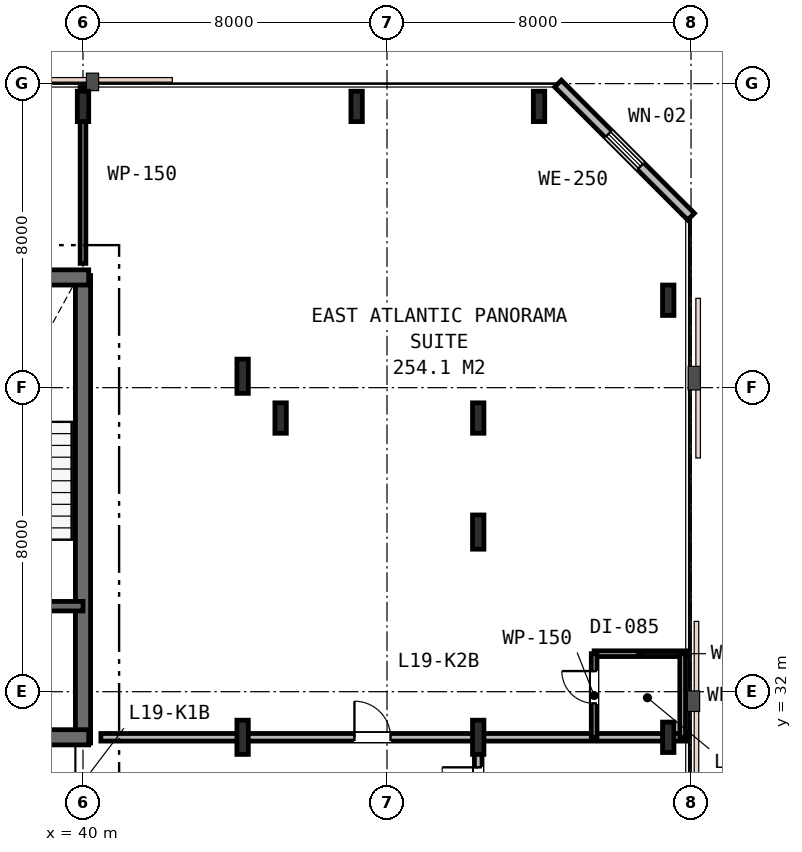
"""IFC4 building model, lengths in metres.
Left out: names, types, materials, properties, quantities, classifications, styles, units other than length and angle.
Written with IfcOpenShell. Run it as: python <this file> out.ifc"""

import sys

from ifc_helpers import new_model, si_unit, direction, frame, frame_2d, origin, origin_2d, place, context, subcontext, project, spatial, rectangle, i_section, extrude, element, fill, save


model = new_model("IFC4")
c1 = context("Model", 3, precision=1e-05, world=origin(), true_north=direction((0.0, 1.0)))
c2 = subcontext(c1, "Body", "Model", "MODEL_VIEW")
j1 = project(units=[si_unit("LENGTHUNIT", "METRE"), si_unit("PLANEANGLEUNIT", "RADIAN")], contexts=[c1])
p1 = place(None, origin())
s1 = spatial("IfcSite", under=j1, at=p1, CompositionType="ELEMENT")
p2 = place(p1, origin())
s2 = spatial("IfcBuilding", under=s1, at=p2, CompositionType="ELEMENT")
p3 = place(p2, frame((0.0, 0.0, 76.2)))
s3 = spatial("IfcBuildingStorey", under=s2, at=p3, CompositionType="ELEMENT", Elevation=76.2)
p4 = place(p3, frame((40.0, 30.65, 0.0), z_axis=(0.0, 0.0, 1.0), x_axis=(0.0, 1.0, 0.0)))
e1 = element("IfcWall", 1, at=p4, inside=s3, PredefinedType="SHEAR", context=c2, shape_type="SweptSolid", body=[
    extrude(rectangle(XDim=12.3, YDim=0.4, at=frame_2d((6.15, 0.0))), origin(), (0.0, 0.0, 1.0), 3.6),
])
p5 = place(p3, frame((15.85, 42.9, 0.0), z_axis=(0.0, 0.0, 1.0), x_axis=(1.0, 0.0, 0.0)))
e2 = element("IfcWall", 2, at=p5, inside=s3, PredefinedType="SHEAR", context=c2, shape_type="SweptSolid", body=[
    extrude(rectangle(XDim=24.3, YDim=0.4, at=frame_2d((12.15, 0.0))), origin(), (0.0, 0.0, 1.0), 3.6),
])
p6 = place(p3, frame((28.95, 30.8, 0.0), z_axis=(0.0, 0.0, 1.0), x_axis=(1.0, 0.0, 0.0)))
e3 = element("IfcWall", 3, at=p6, inside=s3, PredefinedType="SHEAR", context=c2, shape_type="SweptSolid", body=[
    extrude(rectangle(XDim=11.2, YDim=0.4, at=frame_2d((5.6, 0.0))), origin(), (0.0, 0.0, 1.0), 3.6),
])
p7 = place(p6, frame((7.65, 0.0, 0.0)))
e4 = element("IfcOpeningElement", 4, at=p7, cuts=e3, PredefinedType="OPENING", context=c2, shape_type="SweptSolid", body=[
    extrude(rectangle(XDim=1.1, YDim=2.15, at=frame_2d((0.55, 1.075))), frame((0.0, 0.21, 0.0), z_axis=(0.0, -1.0, 0.0), x_axis=(1.0, 0.0, 0.0)), (0.0, 0.0, 1.0), 0.42),
])
p8 = place(p3, frame((33.95, 34.25, 0.0), z_axis=(0.0, 0.0, 1.0), x_axis=(1.0, 0.0, 0.0)))
e5 = element("IfcWall", 5, at=p8, inside=s3, PredefinedType="SHEAR", context=c2, shape_type="SweptSolid", body=[
    extrude(rectangle(XDim=6.05, YDim=0.25, at=frame_2d((3.025, 0.0))), origin(), (0.0, 0.0, 1.0), 3.6),
])
p9 = place(p8, frame((3.7, 0.0, 0.0)))
e6 = element("IfcOpeningElement", 6, at=p9, cuts=e5, PredefinedType="OPENING", context=c2, shape_type="SweptSolid", body=[
    extrude(rectangle(XDim=1.0, YDim=2.15, at=frame_2d((0.5, 1.075))), frame((0.0, 0.135, 0.0), z_axis=(0.0, -1.0, 0.0), x_axis=(1.0, 0.0, 0.0)), (0.0, 0.0, 1.0), 0.27),
])
p10 = place(p8, frame((0.55, 0.0, 0.0)))
e7 = element("IfcOpeningElement", 7, at=p10, cuts=e5, PredefinedType="OPENING", context=c2, shape_type="SweptSolid", body=[
    extrude(rectangle(XDim=1.1, YDim=2.15, at=frame_2d((0.55, 1.075))), frame((0.0, 0.135, 0.0), z_axis=(0.0, -1.0, 0.0), x_axis=(1.0, 0.0, 0.0)), (0.0, 0.0, 1.0), 0.27),
])
for number, where, z_axis, x_axis in (
    (8, (45.2, 39.2, 0.0), (0.0, 0.0, 1.0), (1.0, 0.0, 0.0)),
    (9, (40.0, 47.4, 0.0), (0.0, 0.0, 1.0), (1.0, 0.0, 0.0)),
    (10, (47.2, 47.4, 0.0), (0.0, 0.0, 1.0), (1.0, 0.0, 0.0)),
    (11, (50.4, 39.2, 0.0), (0.0, 0.0, 1.0), (1.0, 0.0, 0.0)),
    (12, (55.4, 30.8, 0.0), (0.0, 0.0, 1.0), (1.0, 0.0, 0.0)),
    (13, (55.4, 42.3, 0.0), (0.0, 0.0, 1.0), (1.0, 0.0, 0.0)),
    (14, (52.0, 47.4, 0.0), (0.0, 0.0, 1.0), (1.0, 0.0, 0.0)),
):
    element("IfcColumn", number, at=place(p3, frame(where, z_axis=z_axis, x_axis=x_axis)), inside=s3, PredefinedType="COLUMN", context=c2, shape_type="SweptSolid", body=[
        extrude(i_section(OverallWidth=0.3, OverallDepth=0.8, WebThickness=0.018, FlangeThickness=0.033, FilletRadius=0.03, at=origin_2d()), origin(), (0.0, 0.0, 1.0), 3.6),
    ])
for number, where, z_axis, x_axis in (
    (15, (44.2, 30.8, 0.0), (0.0, 0.0, 1.0), (1.0, 0.0, 0.0)),
    (16, (44.2, 40.3, 0.0), (0.0, 0.0, 1.0), (1.0, 0.0, 0.0)),
    (17, (50.4, 30.8, 0.0), (0.0, 0.0, 1.0), (1.0, 0.0, 0.0)),
    (18, (50.4, 36.2, 0.0), (0.0, 0.0, 1.0), (1.0, 0.0, 0.0)),
):
    element("IfcColumn", number, at=place(p3, frame(where, z_axis=z_axis, x_axis=x_axis)), inside=s3, PredefinedType="COLUMN", context=c2, shape_type="SweptSolid", body=[
        extrude(i_section(OverallWidth=0.3, OverallDepth=0.9, WebThickness=0.018, FlangeThickness=0.035, FilletRadius=0.03, at=origin_2d()), origin(), (0.0, 0.0, 1.0), 3.6),
    ])
p11 = place(p3, frame((56.0, 44.5, 0.0), z_axis=(0.0, 0.0, 1.0), x_axis=(-0.707106781187, 0.707106781187, 0.0)))
e19 = element("IfcWall", 19, at=p11, inside=s3, PredefinedType="STANDARD", context=c2, shape_type="SweptSolid", body=[
    extrude(rectangle(XDim=4.95, YDim=0.25, at=frame_2d((2.475, 0.0))), origin(), (0.0, 0.0, 1.0), 3.24),
])
p12 = place(p11, frame((1.875, 0.0, 0.85)))
e20 = element("IfcOpeningElement", 20, at=p12, cuts=e19, PredefinedType="OPENING", context=c2, shape_type="SweptSolid", body=[
    extrude(rectangle(XDim=1.2, YDim=1.6, at=frame_2d((0.6, 0.8))), frame((0.0, 0.135, 0.0), z_axis=(0.0, -1.0, 0.0), x_axis=(1.0, 0.0, 0.0)), (0.0, 0.0, 1.0), 0.27),
])
p13 = place(p3, frame((40.0, 43.27, 0.0), z_axis=(0.0, 0.0, 1.0), x_axis=(0.0, 1.0, 0.0)))
e21 = element("IfcWall", 21, at=p13, inside=s3, PredefinedType="PARTITIONING", context=c2, shape_type="SweptSolid", body=[
    extrude(rectangle(XDim=4.63, YDim=0.15, at=frame_2d((2.315, 0.0))), origin(), (0.0, 0.0, 1.0), 2.83),
])
p14 = place(p3, frame((40.47, 30.8, 0.0), z_axis=(0.0, 0.0, 1.0), x_axis=(1.0, 0.0, 0.0)))
e22 = element("IfcWall", 22, at=p14, inside=s3, PredefinedType="PARTITIONING", context=c2, shape_type="SweptSolid", body=[
    extrude(rectangle(XDim=15.43, YDim=0.2, at=frame_2d((7.715, 0.0))), origin(), (0.0, 0.0, 1.0), 2.74),
])
p15 = place(p14, frame((6.673, 0.0, 0.0)))
e23 = element("IfcOpeningElement", 23, at=p15, cuts=e22, PredefinedType="OPENING", context=c2, shape_type="SweptSolid", body=[
    extrude(rectangle(XDim=0.95, YDim=2.15, at=frame_2d((0.475, 1.075))), frame((0.0, 0.11, 0.0), z_axis=(0.0, -1.0, 0.0), x_axis=(1.0, 0.0, 0.0)), (0.0, 0.0, 1.0), 0.22),
])
p16 = place(p3, frame((53.45, 33.0, 0.0), z_axis=(0.0, 0.0, 1.0), x_axis=(1.0, 0.0, 0.0)))
e24 = element("IfcWall", 24, at=p16, inside=s3, PredefinedType="PARTITIONING", context=c2, shape_type="SweptSolid", body=[
    extrude(rectangle(XDim=2.45, YDim=0.15, at=frame_2d((1.225, 0.0))), origin(), (0.0, 0.0, 1.0), 2.83),
])
p17 = place(p3, frame((53.45, 30.8, 0.0), z_axis=(0.0, 0.0, 1.0), x_axis=(0.0, 1.0, 0.0)))
e25 = element("IfcWall", 25, at=p17, inside=s3, PredefinedType="PARTITIONING", context=c2, shape_type="SweptSolid", body=[
    extrude(rectangle(XDim=2.2, YDim=0.15, at=frame_2d((1.1, 0.0))), origin(), (0.0, 0.0, 1.0), 2.74),
])
p18 = place(p17, frame((0.892, 0.0, 0.0)))
e26 = element("IfcOpeningElement", 26, at=p18, cuts=e25, PredefinedType="OPENING", context=c2, shape_type="SweptSolid", body=[
    extrude(rectangle(XDim=0.85, YDim=2.15, at=frame_2d((0.425, 1.075))), frame((0.0, 0.085, 0.0), z_axis=(0.0, -1.0, 0.0), x_axis=(1.0, 0.0, 0.0)), (0.0, 0.0, 1.0), 0.17),
])
p19 = place(p3, frame((55.78, 33.0, 0.0), z_axis=(0.0, 0.0, 1.0), x_axis=(0.0, -1.0, 0.0)))
e27 = element("IfcWall", 27, at=p19, inside=s3, PredefinedType="PARTITIONING", context=c2, shape_type="SweptSolid", body=[
    extrude(rectangle(XDim=2.2, YDim=0.15, at=frame_2d((1.1, 0.0))), origin(), (0.0, 0.0, 1.0), 2.74),
])
p20 = place(p3, frame((50.4, 28.6, 0.0), z_axis=(0.0, 0.0, 1.0), x_axis=(0.0, 1.0, 0.0)))
e28 = element("IfcWall", 28, at=p20, inside=s3, PredefinedType="PARTITIONING", context=c2, shape_type="SweptSolid", body=[
    extrude(rectangle(XDim=2.2, YDim=0.2, at=frame_2d((1.1, 0.0))), origin(), (0.0, 0.0, 1.0), 2.74),
])
p21 = place(p20, frame((0.46, 0.0, 0.0)))
e29 = element("IfcOpeningElement", 29, at=p21, cuts=e28, PredefinedType="OPENING", context=c2, shape_type="SweptSolid", body=[
    extrude(rectangle(XDim=0.95, YDim=2.15, at=frame_2d((0.475, 1.075))), frame((0.0, 0.11, 0.0), z_axis=(0.0, -1.0, 0.0), x_axis=(1.0, 0.0, 0.0)), (0.0, 0.0, 1.0), 0.22),
])
p22 = place(p12, origin())
e30 = element("IfcWindow", 30, at=p22, inside=s3, PartitioningType="SINGLE_PANEL", PredefinedType="WINDOW", context=c2, shape_type="SweptSolid", body=[
    extrude(rectangle(XDim=1.2, YDim=1.6, at=frame_2d((0.6, 0.8))), frame((0.0, 0.03, 0.0), z_axis=(0.0, -1.0, 0.0), x_axis=(1.0, 0.0, 0.0)), (0.0, 0.0, 1.0), 0.06),
])
fill(e20, e30)
p23 = place(p15, origin())
e31 = element("IfcDoor", 31, at=p23, inside=s3, OperationType="SINGLE_SWING_LEFT", PredefinedType="DOOR", context=c2, shape_type="SweptSolid", body=[
    extrude(rectangle(XDim=0.95, YDim=2.15, at=frame_2d((0.475, 1.075))), frame((0.0, 0.025, 0.0), z_axis=(0.0, -1.0, 0.0), x_axis=(1.0, 0.0, 0.0)), (0.0, 0.0, 1.0), 0.05),
])
fill(e23, e31)
p24 = place(p18, origin())
e32 = element("IfcDoor", 32, at=p24, inside=s3, OperationType="SINGLE_SWING_RIGHT", PredefinedType="DOOR", context=c2, shape_type="SweptSolid", body=[
    extrude(rectangle(XDim=0.85, YDim=2.15, at=frame_2d((0.425, 1.075))), frame((0.0, 0.025, 0.0), z_axis=(0.0, -1.0, 0.0), x_axis=(1.0, 0.0, 0.0)), (0.0, 0.0, 1.0), 0.05),
])
fill(e26, e32)
p25 = place(p21, origin())
e33 = element("IfcDoor", 33, at=p25, inside=s3, OperationType="SINGLE_SWING_RIGHT", PredefinedType="DOOR", context=c2, shape_type="SweptSolid", body=[
    extrude(rectangle(XDim=0.95, YDim=2.15, at=frame_2d((0.475, 1.075))), frame((0.0, 0.025, 0.0), z_axis=(0.0, -1.0, 0.0), x_axis=(1.0, 0.0, 0.0)), (0.0, 0.0, 1.0), 0.05),
])
fill(e29, e33)
save(model, sys.argv[1])
